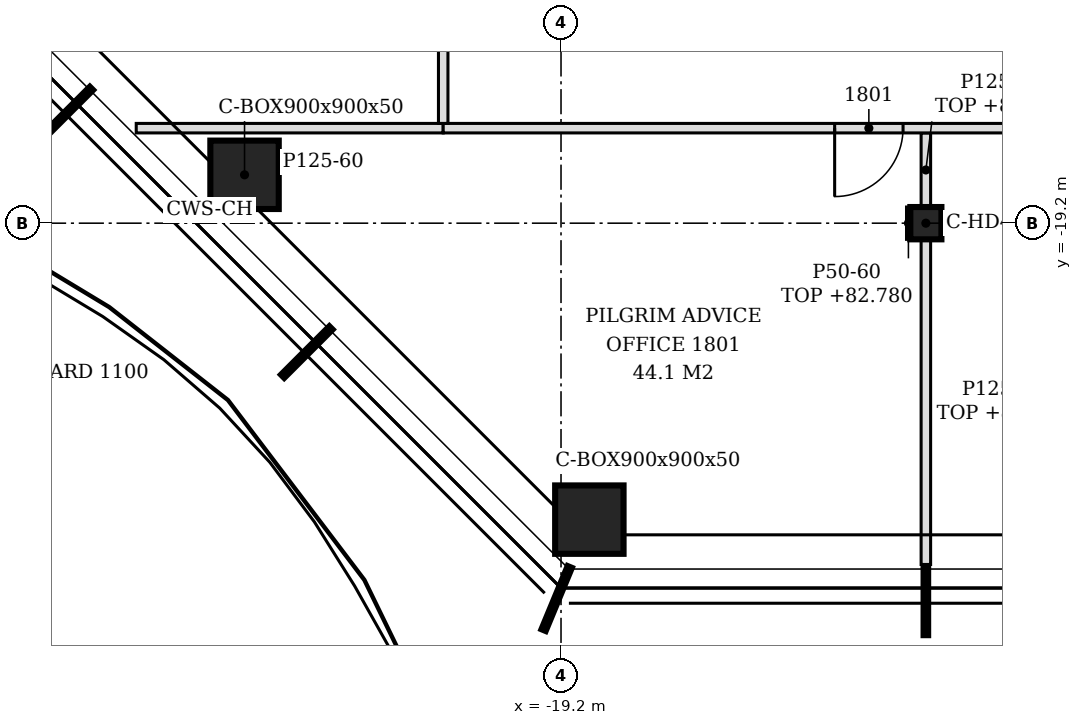
"""IFC4 building model, lengths in metres.
Left out: names, types, materials, properties, quantities, classifications, styles, units other than length and angle.
Written with IfcOpenShell. Run it as: python <this file> out.ifc"""

import sys

from ifc_helpers import new_model, si_unit, direction, frame, frame_2d, origin, origin_2d, place, context, subcontext, project, spatial, polyline, rectangle, hollow_rectangle, i_section, outline, extrude, element, fill, save


model = new_model("IFC4")
c1 = context("Model", 3, precision=1e-05, world=origin(), true_north=direction((0.0, 1.0)))
c2 = subcontext(c1, "Body", "Model", "MODEL_VIEW")
j1 = project(units=[si_unit("LENGTHUNIT", "METRE"), si_unit("PLANEANGLEUNIT", "RADIAN")], contexts=[c1])
p1 = place(None, origin())
s1 = spatial("IfcSite", under=j1, at=p1, CompositionType="ELEMENT")
p2 = place(p1, origin())
s2 = spatial("IfcBuilding", under=s1, at=p2, CompositionType="ELEMENT")
p3 = place(p2, frame((0.0, 0.0, 79.8)))
s3 = spatial("IfcBuildingStorey", under=s2, at=p3, CompositionType="ELEMENT", Elevation=79.8)
for number, where, z_axis, x_axis in (
    (1, (-18.827, -23.1, -0.15), (0.0, 0.0, 1.0), (1.0, 0.0, 0.0)),
    (2, (-23.364, -18.564, -0.15), (0.0, 0.0, 1.0), (1.0, 0.0, 0.0)),
):
    element("IfcColumn", number, at=place(p3, frame(where, z_axis=z_axis, x_axis=x_axis)), inside=s3, PredefinedType="COLUMN", context=c2, shape_type="SweptSolid", body=[
        extrude(hollow_rectangle(XDim=0.9, YDim=0.9, WallThickness=0.05, at=origin_2d()), origin(), (0.0, 0.0, 1.0), 3.6),
    ])
p4 = place(p3, frame((-14.4, -19.2, -0.15), z_axis=(0.0, 0.0, 1.0), x_axis=(1.0, 0.0, 0.0)))
e3 = element("IfcColumn", 3, at=p4, inside=s3, PredefinedType="COLUMN", context=c2, shape_type="SweptSolid", body=[
    extrude(i_section(OverallWidth=0.409, OverallDepth=0.425, WebThickness=0.033, FlangeThickness=0.052, FilletRadius=0.015, at=origin_2d()), origin(), (0.0, 0.0, 1.0), 3.6),
])
p5 = place(p3, frame((-14.4, -23.69, 0.0), z_axis=(0.0, 0.0, 1.0), x_axis=(0.0, 1.0, 0.0)))
e4 = element("IfcWall", 4, at=p5, inside=s3, PredefinedType="PARTITIONING", context=c2, shape_type="SweptSolid", body=[
    extrude(outline(polyline([(0.0, 0.0), (4.277, 0.0), (4.278, 3.03), (0.74, 3.03), (0.738, 2.93), (0.44, 2.93), (0.438, 3.03), (0.0, 3.03), (0.0, 0.0)])), frame((0.0, 0.062, 0.0), z_axis=(0.0, -1.0, 0.0), x_axis=(1.0, 0.0, 0.0)), (0.0, 0.0, 1.0), 0.125),
])
p6 = place(p3, frame((-14.4, -18.988, 0.0), z_axis=(0.0, 0.0, 1.0), x_axis=(0.0, 1.0, 0.0)))
e5 = element("IfcWall", 5, at=p6, inside=s3, PredefinedType="PARTITIONING", context=c2, shape_type="SweptSolid", body=[
    extrude(rectangle(XDim=0.975, YDim=0.125, at=frame_2d((0.488, 0.0))), origin(), (0.0, 0.0, 1.0), 2.93),
])
p7 = place(p3, frame((-24.789, -17.95, 0.0), z_axis=(0.0, 0.0, 1.0), x_axis=(1.0, 0.0, 0.0)))
e6 = element("IfcWall", 6, at=p7, inside=s3, PredefinedType="PARTITIONING", context=c2, shape_type="SweptSolid", body=[
    extrude(outline(polyline([(0.0, 0.0), (4.039, 0.0), (4.039, 3.45), (1.086, 3.45), (1.084, 2.93), (0.537, 2.93), (0.535, 3.45), (0.0, 3.45), (0.0, 0.0)])), frame((0.0, 0.062, 0.0), z_axis=(0.0, -1.0, 0.0), x_axis=(1.0, 0.0, 0.0)), (0.0, 0.0, 1.0), 0.125),
])
p8 = place(p3, frame((-20.75, -17.95, 0.0), z_axis=(0.0, 0.0, 1.0), x_axis=(1.0, 0.0, 0.0)))
e7 = element("IfcWall", 7, at=p8, inside=s3, PredefinedType="PARTITIONING", context=c2, shape_type="SweptSolid", body=[
    extrude(outline(polyline([(0.0, 0.0), (39.887, 0.0), (39.887, 2.73), (39.8, 2.73), (39.798, 3.45), (28.1, 3.45), (28.098, 2.73), (27.8, 2.73), (27.798, 3.45), (16.1, 3.45), (16.098, 2.73), (15.8, 2.73), (15.798, 3.45), (6.5, 3.45), (6.498, 2.93), (6.2, 2.93), (6.198, 3.45), (0.0, 3.45), (0.0, 0.0)])), frame((0.0, 0.062, 0.0), z_axis=(0.0, -1.0, 0.0), x_axis=(1.0, 0.0, 0.0)), (0.0, 0.0, 1.0), 0.125),
])
p9 = place(p8, frame((5.15, 0.0, 0.0)))
e8 = element("IfcOpeningElement", 8, at=p9, cuts=e7, PredefinedType="OPENING", context=c2, shape_type="SweptSolid", body=[
    extrude(rectangle(XDim=0.9, YDim=2.1, at=frame_2d((0.45, 1.05))), frame((0.0, 0.073, 0.0), z_axis=(0.0, -1.0, 0.0), x_axis=(1.0, 0.0, 0.0)), (0.0, 0.0, 1.0), 0.145),
])
p10 = place(p8, frame((14.75, 0.0, 0.0)))
e9 = element("IfcOpeningElement", 9, at=p10, cuts=e7, PredefinedType="OPENING", context=c2, shape_type="SweptSolid", body=[
    extrude(rectangle(XDim=0.9, YDim=2.1, at=frame_2d((0.45, 1.05))), frame((0.0, 0.073, 0.0), z_axis=(0.0, -1.0, 0.0), x_axis=(1.0, 0.0, 0.0)), (0.0, 0.0, 1.0), 0.145),
])
p11 = place(p8, frame((24.35, 0.0, 0.0)))
e10 = element("IfcOpeningElement", 10, at=p11, cuts=e7, PredefinedType="OPENING", context=c2, shape_type="SweptSolid", body=[
    extrude(rectangle(XDim=0.9, YDim=2.1, at=frame_2d((0.45, 1.05))), frame((0.0, 0.073, 0.0), z_axis=(0.0, -1.0, 0.0), x_axis=(1.0, 0.0, 0.0)), (0.0, 0.0, 1.0), 0.145),
])
p12 = place(p8, frame((29.75, 0.0, 0.0)))
e11 = element("IfcOpeningElement", 11, at=p12, cuts=e7, PredefinedType="OPENING", context=c2, shape_type="SweptSolid", body=[
    extrude(rectangle(XDim=0.9, YDim=2.1, at=frame_2d((0.45, 1.05))), frame((0.0, 0.073, 0.0), z_axis=(0.0, -1.0, 0.0), x_axis=(1.0, 0.0, 0.0)), (0.0, 0.0, 1.0), 0.145),
])
p13 = place(p8, frame((35.45, 0.0, 0.0)))
e12 = element("IfcOpeningElement", 12, at=p13, cuts=e7, PredefinedType="OPENING", context=c2, shape_type="SweptSolid", body=[
    extrude(rectangle(XDim=0.9, YDim=2.1, at=frame_2d((0.45, 1.05))), frame((0.0, 0.073, 0.0), z_axis=(0.0, -1.0, 0.0), x_axis=(1.0, 0.0, 0.0)), (0.0, 0.0, 1.0), 0.145),
])
p14 = place(p3, frame((-20.75, -17.887, 0.0), z_axis=(0.0, 0.0, 1.0), x_axis=(0.0, 1.0, 0.0)))
e13 = element("IfcWall", 13, at=p14, inside=s3, PredefinedType="PARTITIONING", context=c2, shape_type="SweptSolid", body=[
    extrude(outline(polyline([(0.0, 0.0), (39.876, 0.0), (39.876, 3.45), (39.622, 3.45), (39.62, 2.63), (38.507, 2.63), (38.505, 3.45), (37.183, 3.45), (37.18, 2.98), (36.992, 2.98), (36.99, 3.45), (32.397, 3.45), (32.396, 2.83), (32.177, 2.83), (32.176, 3.45), (27.597, 3.45), (27.595, 2.83), (27.377, 2.83), (27.375, 3.45), (22.798, 3.45), (22.795, 2.83), (22.577, 2.83), (22.575, 3.45), (17.998, 3.45), (17.996, 2.83), (17.778, 2.83), (17.775, 3.45), (13.198, 3.45), (13.196, 2.83), (12.978, 2.83), (12.976, 3.45), (8.397, 3.45), (8.396, 2.83), (8.177, 2.83), (8.176, 3.45), (3.597, 3.45), (3.595, 2.83), (3.377, 2.83), (3.375, 3.45), (0.0, 3.45), (0.0, 0.0)])), frame((0.0, 0.062, 0.0), z_axis=(0.0, -1.0, 0.0), x_axis=(1.0, 0.0, 0.0)), (0.0, 0.0, 1.0), 0.125),
])
p15 = place(p14, frame((4.738, 0.0, 0.0)))
e14 = element("IfcOpeningElement", 14, at=p15, cuts=e13, PredefinedType="OPENING", context=c2, shape_type="SweptSolid", body=[
    extrude(rectangle(XDim=0.9, YDim=2.1, at=frame_2d((0.45, 1.05))), frame((0.0, 0.073, 0.0), z_axis=(0.0, -1.0, 0.0), x_axis=(1.0, 0.0, 0.0)), (0.0, 0.0, 1.0), 0.145),
])
p16 = place(p14, frame((13.387, 0.0, 0.0)))
e15 = element("IfcOpeningElement", 15, at=p16, cuts=e13, PredefinedType="OPENING", context=c2, shape_type="SweptSolid", body=[
    extrude(rectangle(XDim=0.9, YDim=2.1, at=frame_2d((0.45, 1.05))), frame((0.0, 0.073, 0.0), z_axis=(0.0, -1.0, 0.0), x_axis=(1.0, 0.0, 0.0)), (0.0, 0.0, 1.0), 0.145),
])
p17 = place(p14, frame((20.988, 0.0, 0.0)))
e16 = element("IfcOpeningElement", 16, at=p17, cuts=e13, PredefinedType="OPENING", context=c2, shape_type="SweptSolid", body=[
    extrude(rectangle(XDim=0.9, YDim=2.1, at=frame_2d((0.45, 1.05))), frame((0.0, 0.073, 0.0), z_axis=(0.0, -1.0, 0.0), x_axis=(1.0, 0.0, 0.0)), (0.0, 0.0, 1.0), 0.145),
])
p18 = place(p14, frame((31.387, 0.0, 0.0)))
e17 = element("IfcOpeningElement", 17, at=p18, cuts=e13, PredefinedType="OPENING", context=c2, shape_type="SweptSolid", body=[
    extrude(rectangle(XDim=0.9, YDim=2.1, at=frame_2d((0.45, 1.05))), frame((0.0, 0.073, 0.0), z_axis=(0.0, -1.0, 0.0), x_axis=(1.0, 0.0, 0.0)), (0.0, 0.0, 1.0), 0.145),
])
p19 = place(p3, frame((-14.629, -19.413, 0.0), z_axis=(0.0, 0.0, 1.0), x_axis=(0.0, 1.0, 0.0)))
e18 = element("IfcWall", 18, at=p19, inside=s3, PredefinedType="PARTITIONING", context=c2, shape_type="SweptSolid", body=[
    extrude(rectangle(XDim=0.425, YDim=0.05, at=frame_2d((0.212, 0.0))), origin(), (0.0, 0.0, 1.0), 2.98),
])
p20 = place(p9, frame((0.9, 0.0, 0.0), z_axis=(0.0, 0.0, 1.0), x_axis=(-1.0, 0.0, 0.0)))
e19 = element("IfcDoor", 19, at=p20, inside=s3, OperationType="SINGLE_SWING_RIGHT", PredefinedType="DOOR", context=c2, shape_type="SweptSolid", body=[
    extrude(rectangle(XDim=0.9, YDim=2.1, at=frame_2d((0.45, 1.05))), frame((0.0, 0.025, 0.0), z_axis=(0.0, -1.0, 0.0), x_axis=(1.0, 0.0, 0.0)), (0.0, 0.0, 1.0), 0.05),
])
fill(e8, e19)
save(model, sys.argv[1])
